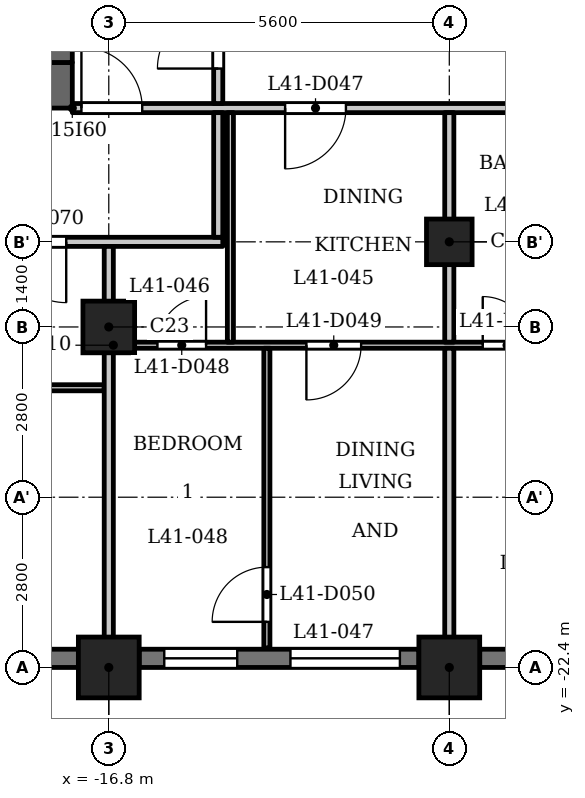
"""IFC4 building model, lengths in metres.
Left out: names, types, materials, properties, quantities, classifications, styles, units other than length and angle.
Written with IfcOpenShell. Run it as: python <this file> out.ifc"""

import sys

from ifc_helpers import new_model, si_unit, direction, frame, frame_2d, origin, origin_2d, place, context, subcontext, project, spatial, rectangle, extrude, element, fill, save


model = new_model("IFC4")
c1 = context("Model", 3, precision=1e-05, world=origin(), true_north=direction((0.0, 1.0)))
c2 = subcontext(c1, "Body", "Model", "MODEL_VIEW")
j1 = project(units=[si_unit("LENGTHUNIT", "METRE"), si_unit("PLANEANGLEUNIT", "RADIAN")], contexts=[c1])
p1 = place(None, origin())
s1 = spatial("IfcSite", under=j1, at=p1, CompositionType="ELEMENT")
p2 = place(p1, origin())
s2 = spatial("IfcBuilding", under=s1, at=p2, CompositionType="ELEMENT")
p3 = place(p2, frame((0.0, 0.0, 160.6)))
s3 = spatial("IfcBuildingStorey", under=s2, at=p3, CompositionType="ELEMENT", Elevation=160.6)
for number, where, z_axis, x_axis in (
    (1, (-16.8, -22.4, 0.0), (0.0, 0.0, 1.0), (1.0, 0.0, 0.0)),
    (2, (-11.2, -22.4, 0.0), (0.0, 0.0, 1.0), (1.0, 0.0, 0.0)),
):
    element("IfcColumn", number, at=place(p3, frame(where, z_axis=z_axis, x_axis=x_axis)), inside=s3, PredefinedType="COLUMN", context=c2, shape_type="SweptSolid", body=[
        extrude(rectangle(XDim=1.0, YDim=1.0, at=origin_2d()), origin(), (0.0, 0.0, 1.0), 3.5),
    ])
p4 = place(p3, frame((-16.8, -16.8, 0.0), z_axis=(0.0, 0.0, 1.0), x_axis=(1.0, 0.0, 0.0)))
e3 = element("IfcColumn", 3, at=p4, inside=s3, PredefinedType="COLUMN", context=c2, shape_type="SweptSolid", body=[
    extrude(rectangle(XDim=0.85, YDim=0.85, at=origin_2d()), origin(), (0.0, 0.0, 1.0), 3.5),
])
p5 = place(p3, frame((-11.2, -15.4, 0.0), z_axis=(0.0, 0.0, 1.0), x_axis=(1.0, 0.0, 0.0)))
e4 = element("IfcColumn", 4, at=p5, inside=s3, PredefinedType="COLUMN", context=c2, shape_type="SweptSolid", body=[
    extrude(rectangle(XDim=0.75, YDim=0.75, at=origin_2d()), origin(), (0.0, 0.0, 1.0), 3.5),
])
p6 = place(p3, frame((-20.0, -22.25, 0.0), z_axis=(0.0, 0.0, 1.0), x_axis=(1.0, 0.0, 0.0)))
e5 = element("IfcWall", 5, at=p6, inside=s3, PredefinedType="SOLIDWALL", context=c2, shape_type="SweptSolid", body=[
    extrude(rectangle(XDim=2.7, YDim=0.3, at=frame_2d((1.35, 0.0))), origin(), (0.0, 0.0, 1.0), 2.45),
])
p7 = place(p6, frame((0.75, 0.0, 0.6)))
e6 = element("IfcOpeningElement", 6, at=p7, cuts=e5, PredefinedType="OPENING", context=c2, shape_type="SweptSolid", body=[
    extrude(rectangle(XDim=1.2, YDim=1.55, at=frame_2d((0.6, 0.775))), frame((0.0, 0.16, 0.0), z_axis=(0.0, -1.0, 0.0), x_axis=(1.0, 0.0, 0.0)), (0.0, 0.0, 1.0), 0.32),
])
p8 = place(p3, frame((-16.3, -22.25, 0.0), z_axis=(0.0, 0.0, 1.0), x_axis=(1.0, 0.0, 0.0)))
e7 = element("IfcWall", 7, at=p8, inside=s3, PredefinedType="SOLIDWALL", context=c2, shape_type="SweptSolid", body=[
    extrude(rectangle(XDim=4.6, YDim=0.3, at=frame_2d((2.3, 0.0))), origin(), (0.0, 0.0, 1.0), 2.45),
])
p9 = place(p8, frame((0.413, 0.0, 0.6)))
e8 = element("IfcOpeningElement", 8, at=p9, cuts=e7, PredefinedType="OPENING", context=c2, shape_type="SweptSolid", body=[
    extrude(rectangle(XDim=1.2, YDim=1.55, at=frame_2d((0.6, 0.775))), frame((0.0, 0.16, 0.0), z_axis=(0.0, -1.0, 0.0), x_axis=(1.0, 0.0, 0.0)), (0.0, 0.0, 1.0), 0.32),
])
p10 = place(p8, frame((2.488, 0.0, 0.9)))
e9 = element("IfcOpeningElement", 9, at=p10, cuts=e7, PredefinedType="OPENING", context=c2, shape_type="SweptSolid", body=[
    extrude(rectangle(XDim=1.8, YDim=1.25, at=frame_2d((0.9, 0.625))), frame((0.0, 0.16, 0.0), z_axis=(0.0, -1.0, 0.0), x_axis=(1.0, 0.0, 0.0)), (0.0, 0.0, 1.0), 0.32),
])
p11 = place(p3, frame((-10.7, -22.25, 0.0), z_axis=(0.0, 0.0, 1.0), x_axis=(1.0, 0.0, 0.0)))
e10 = element("IfcWall", 10, at=p11, inside=s3, PredefinedType="SOLIDWALL", context=c2, shape_type="SweptSolid", body=[
    extrude(rectangle(XDim=4.6, YDim=0.3, at=frame_2d((2.3, 0.0))), origin(), (0.0, 0.0, 1.0), 2.45),
])
p12 = place(p11, frame((0.5, 0.0, 1.2)))
e11 = element("IfcOpeningElement", 11, at=p12, cuts=e10, PredefinedType="OPENING", context=c2, shape_type="SweptSolid", body=[
    extrude(rectangle(XDim=3.6, YDim=0.95, at=frame_2d((1.8, 0.475))), frame((0.0, 0.16, 0.0), z_axis=(0.0, -1.0, 0.0), x_axis=(1.0, 0.0, 0.0)), (0.0, 0.0, 1.0), 0.32),
])
p13 = place(p3, frame((-17.4, -12.825, 0.0), z_axis=(0.0, 0.0, 1.0), x_axis=(-1.0, 0.0, 0.0)))
e12 = element("IfcWall", 12, at=p13, inside=s3, PredefinedType="SHEAR", context=c2, shape_type="SweptSolid", body=[
    extrude(rectangle(XDim=10.4, YDim=0.75, at=frame_2d((5.2, 0.0))), origin(), (0.0, 0.0, 1.0), 3.2),
])
p14 = place(p3, frame((-17.6, -12.45, 0.0), z_axis=(0.0, 0.0, 1.0), x_axis=(0.0, 1.0, 0.0)))
e13 = element("IfcWall", 13, at=p14, inside=s3, PredefinedType="SHEAR", context=c2, shape_type="SweptSolid", body=[
    extrude(rectangle(XDim=24.9, YDim=0.4, at=frame_2d((12.45, 0.0))), origin(), (0.0, 0.0, 1.0), 3.2),
])
p15 = place(p14, frame((8.65, 0.0, 0.0)))
e14 = element("IfcOpeningElement", 14, at=p15, cuts=e13, PredefinedType="OPENING", context=c2, shape_type="SweptSolid", body=[
    extrude(rectangle(XDim=0.9, YDim=2.1, at=frame_2d((0.45, 1.05))), frame((0.0, 0.21, 0.0), z_axis=(0.0, -1.0, 0.0), x_axis=(1.0, 0.0, 0.0)), (0.0, 0.0, 1.0), 0.42),
])
p16 = place(p14, frame((15.6, 0.0, 0.0)))
e15 = element("IfcOpeningElement", 15, at=p16, cuts=e13, PredefinedType="OPENING", context=c2, shape_type="SweptSolid", body=[
    extrude(rectangle(XDim=1.1, YDim=2.1, at=frame_2d((0.55, 1.05))), frame((0.0, 0.21, 0.0), z_axis=(0.0, -1.0, 0.0), x_axis=(1.0, 0.0, 0.0)), (0.0, 0.0, 1.0), 0.42),
])
p17 = place(p14, frame((18.0, 0.0, 0.0)))
e16 = element("IfcOpeningElement", 16, at=p17, cuts=e13, PredefinedType="OPENING", context=c2, shape_type="SweptSolid", body=[
    extrude(rectangle(XDim=1.1, YDim=2.1, at=frame_2d((0.55, 1.05))), frame((0.0, 0.21, 0.0), z_axis=(0.0, -1.0, 0.0), x_axis=(1.0, 0.0, 0.0)), (0.0, 0.0, 1.0), 0.42),
])
p18 = place(p14, frame((23.025, 0.0, 0.0)))
e17 = element("IfcOpeningElement", 17, at=p18, cuts=e13, PredefinedType="OPENING", context=c2, shape_type="SweptSolid", body=[
    extrude(rectangle(XDim=1.1, YDim=2.1, at=frame_2d((0.55, 1.05))), frame((0.0, 0.21, 0.0), z_axis=(0.0, -1.0, 0.0), x_axis=(1.0, 0.0, 0.0)), (0.0, 0.0, 1.0), 0.42),
])
p19 = place(p14, frame((0.775, 0.0, 0.0)))
e18 = element("IfcOpeningElement", 18, at=p19, cuts=e13, PredefinedType="OPENING", context=c2, shape_type="SweptSolid", body=[
    extrude(rectangle(XDim=1.1, YDim=2.1, at=frame_2d((0.55, 1.05))), frame((0.0, 0.21, 0.0), z_axis=(0.0, -1.0, 0.0), x_axis=(1.0, 0.0, 0.0)), (0.0, 0.0, 1.0), 0.42),
])
p20 = place(p14, frame((12.925, 0.0, 0.0)))
e19 = element("IfcOpeningElement", 19, at=p20, cuts=e13, PredefinedType="OPENING", context=c2, shape_type="SweptSolid", body=[
    extrude(rectangle(XDim=1.8, YDim=2.1, at=frame_2d((0.9, 1.05))), frame((0.0, 0.21, 0.0), z_axis=(0.0, -1.0, 0.0), x_axis=(1.0, 0.0, 0.0)), (0.0, 0.0, 1.0), 0.42),
])
p21 = place(p3, frame((-26.394, -17.8, 0.0), z_axis=(0.0, 0.0, 1.0), x_axis=(1.0, 0.0, 0.0)))
e20 = element("IfcWall", 20, at=p21, inside=s3, PredefinedType="PARTITIONING", context=c2, shape_type="SweptSolid", body=[
    extrude(rectangle(XDim=9.519, YDim=0.1, at=frame_2d((4.76, 0.0))), origin(), (0.0, 0.0, 1.0), 3.2),
])
p22 = place(p21, frame((2.544, 0.0, 0.0)))
e21 = element("IfcOpeningElement", 21, at=p22, cuts=e20, PredefinedType="OPENING", context=c2, shape_type="SweptSolid", body=[
    extrude(rectangle(XDim=0.8, YDim=2.1, at=frame_2d((0.4, 1.05))), frame((0.0, 0.06, 0.0), z_axis=(0.0, -1.0, 0.0), x_axis=(1.0, 0.0, 0.0)), (0.0, 0.0, 1.0), 0.12),
])
p23 = place(p21, frame((6.894, 0.0, 0.0)))
e22 = element("IfcOpeningElement", 22, at=p23, cuts=e20, PredefinedType="OPENING", context=c2, shape_type="SweptSolid", body=[
    extrude(rectangle(XDim=0.9, YDim=2.1, at=frame_2d((0.45, 1.05))), frame((0.0, 0.06, 0.0), z_axis=(0.0, -1.0, 0.0), x_axis=(1.0, 0.0, 0.0)), (0.0, 0.0, 1.0), 0.12),
])
p24 = place(p3, frame((-16.725, -17.1, 0.0), z_axis=(0.0, 0.0, 1.0), x_axis=(1.0, 0.0, 0.0)))
e23 = element("IfcWall", 23, at=p24, inside=s3, PredefinedType="PARTITIONING", context=c2, shape_type="SweptSolid", body=[
    extrude(rectangle(XDim=33.45, YDim=0.1, at=frame_2d((16.725, 0.0))), origin(), (0.0, 0.0, 1.0), 3.2),
])
p25 = place(p24, frame((0.725, 0.0, 0.0)))
e24 = element("IfcOpeningElement", 24, at=p25, cuts=e23, PredefinedType="OPENING", context=c2, shape_type="SweptSolid", body=[
    extrude(rectangle(XDim=0.8, YDim=2.1, at=frame_2d((0.4, 1.05))), frame((0.0, 0.06, 0.0), z_axis=(0.0, -1.0, 0.0), x_axis=(1.0, 0.0, 0.0)), (0.0, 0.0, 1.0), 0.12),
])
p26 = place(p24, frame((3.175, 0.0, 0.0)))
e25 = element("IfcOpeningElement", 25, at=p26, cuts=e23, PredefinedType="OPENING", context=c2, shape_type="SweptSolid", body=[
    extrude(rectangle(XDim=0.9, YDim=2.1, at=frame_2d((0.45, 1.05))), frame((0.0, 0.06, 0.0), z_axis=(0.0, -1.0, 0.0), x_axis=(1.0, 0.0, 0.0)), (0.0, 0.0, 1.0), 0.12),
])
p27 = place(p24, frame((6.075, 0.0, 0.0)))
e26 = element("IfcOpeningElement", 26, at=p27, cuts=e23, PredefinedType="OPENING", context=c2, shape_type="SweptSolid", body=[
    extrude(rectangle(XDim=0.8, YDim=2.1, at=frame_2d((0.4, 1.05))), frame((0.0, 0.06, 0.0), z_axis=(0.0, -1.0, 0.0), x_axis=(1.0, 0.0, 0.0)), (0.0, 0.0, 1.0), 0.12),
])
p28 = place(p24, frame((9.425, 0.0, 0.0)))
e27 = element("IfcOpeningElement", 27, at=p28, cuts=e23, PredefinedType="OPENING", context=c2, shape_type="SweptSolid", body=[
    extrude(rectangle(XDim=0.9, YDim=2.1, at=frame_2d((0.45, 1.05))), frame((0.0, 0.06, 0.0), z_axis=(0.0, -1.0, 0.0), x_axis=(1.0, 0.0, 0.0)), (0.0, 0.0, 1.0), 0.12),
])
p29 = place(p24, frame((12.675, 0.0, 0.0)))
e28 = element("IfcOpeningElement", 28, at=p29, cuts=e23, PredefinedType="OPENING", context=c2, shape_type="SweptSolid", body=[
    extrude(rectangle(XDim=0.8, YDim=2.1, at=frame_2d((0.4, 1.05))), frame((0.0, 0.06, 0.0), z_axis=(0.0, -1.0, 0.0), x_axis=(1.0, 0.0, 0.0)), (0.0, 0.0, 1.0), 0.12),
])
p30 = place(p24, frame((15.275, 0.0, 0.0)))
e29 = element("IfcOpeningElement", 29, at=p30, cuts=e23, PredefinedType="OPENING", context=c2, shape_type="SweptSolid", body=[
    extrude(rectangle(XDim=0.9, YDim=2.1, at=frame_2d((0.45, 1.05))), frame((0.0, 0.06, 0.0), z_axis=(0.0, -1.0, 0.0), x_axis=(1.0, 0.0, 0.0)), (0.0, 0.0, 1.0), 0.12),
])
p31 = place(p24, frame((20.625, 0.0, 0.0)))
e30 = element("IfcOpeningElement", 30, at=p31, cuts=e23, PredefinedType="OPENING", context=c2, shape_type="SweptSolid", body=[
    extrude(rectangle(XDim=0.8, YDim=2.1, at=frame_2d((0.4, 1.05))), frame((0.0, 0.06, 0.0), z_axis=(0.0, -1.0, 0.0), x_axis=(1.0, 0.0, 0.0)), (0.0, 0.0, 1.0), 0.12),
])
p32 = place(p24, frame((17.375, 0.0, 0.0)))
e31 = element("IfcOpeningElement", 31, at=p32, cuts=e23, PredefinedType="OPENING", context=c2, shape_type="SweptSolid", body=[
    extrude(rectangle(XDim=0.9, YDim=2.1, at=frame_2d((0.45, 1.05))), frame((0.0, 0.06, 0.0), z_axis=(0.0, -1.0, 0.0), x_axis=(1.0, 0.0, 0.0)), (0.0, 0.0, 1.0), 0.12),
])
p33 = place(p24, frame((31.075, 0.0, 0.0)))
e32 = element("IfcOpeningElement", 32, at=p33, cuts=e23, PredefinedType="OPENING", context=c2, shape_type="SweptSolid", body=[
    extrude(rectangle(XDim=0.8, YDim=2.1, at=frame_2d((0.4, 1.05))), frame((0.0, 0.06, 0.0), z_axis=(0.0, -1.0, 0.0), x_axis=(1.0, 0.0, 0.0)), (0.0, 0.0, 1.0), 0.12),
])
p34 = place(p24, frame((29.325, 0.0, 0.0)))
e33 = element("IfcOpeningElement", 33, at=p34, cuts=e23, PredefinedType="OPENING", context=c2, shape_type="SweptSolid", body=[
    extrude(rectangle(XDim=0.9, YDim=2.1, at=frame_2d((0.45, 1.05))), frame((0.0, 0.06, 0.0), z_axis=(0.0, -1.0, 0.0), x_axis=(1.0, 0.0, 0.0)), (0.0, 0.0, 1.0), 0.12),
])
p35 = place(p24, frame((23.725, 0.0, 0.0)))
e34 = element("IfcOpeningElement", 34, at=p35, cuts=e23, PredefinedType="OPENING", context=c2, shape_type="SweptSolid", body=[
    extrude(rectangle(XDim=0.9, YDim=2.1, at=frame_2d((0.45, 1.05))), frame((0.0, 0.06, 0.0), z_axis=(0.0, -1.0, 0.0), x_axis=(1.0, 0.0, 0.0)), (0.0, 0.0, 1.0), 0.12),
])
p36 = place(p24, frame((25.775, 0.0, 0.0)))
e35 = element("IfcOpeningElement", 35, at=p36, cuts=e23, PredefinedType="OPENING", context=c2, shape_type="SweptSolid", body=[
    extrude(rectangle(XDim=0.9, YDim=2.1, at=frame_2d((0.45, 1.05))), frame((0.0, 0.06, 0.0), z_axis=(0.0, -1.0, 0.0), x_axis=(1.0, 0.0, 0.0)), (0.0, 0.0, 1.0), 0.12),
])
p37 = place(p3, frame((-27.484, -15.4, 0.0), z_axis=(0.0, 0.0, 1.0), x_axis=(1.0, 0.0, 0.0)))
e36 = element("IfcWall", 36, at=p37, inside=s3, PredefinedType="PARTITIONING", context=c2, shape_type="SweptSolid", body=[
    extrude(rectangle(XDim=12.559, YDim=0.15, at=frame_2d((6.279, 0.0))), origin(), (0.0, 0.0, 1.0), 3.2),
])
p38 = place(p37, frame((8.984, 0.0, 0.0)))
e37 = element("IfcOpeningElement", 37, at=p38, cuts=e36, PredefinedType="OPENING", context=c2, shape_type="SweptSolid", body=[
    extrude(rectangle(XDim=1.0, YDim=2.1, at=frame_2d((0.5, 1.05))), frame((0.0, 0.085, 0.0), z_axis=(0.0, -1.0, 0.0), x_axis=(1.0, 0.0, 0.0)), (0.0, 0.0, 1.0), 0.17),
])
p39 = place(p3, frame((-17.4, -13.2, 0.0), z_axis=(0.0, 0.0, 1.0), x_axis=(1.0, 0.0, 0.0)))
e38 = element("IfcWall", 38, at=p39, inside=s3, PredefinedType="PARTITIONING", context=c2, shape_type="SweptSolid", body=[
    extrude(rectangle(XDim=34.8, YDim=0.15, at=frame_2d((17.4, 0.0))), origin(), (0.0, 0.0, 1.0), 3.2),
])
p40 = place(p39, frame((0.15, 0.0, 0.0)))
e39 = element("IfcOpeningElement", 39, at=p40, cuts=e38, PredefinedType="OPENING", context=c2, shape_type="SweptSolid", body=[
    extrude(rectangle(XDim=1.0, YDim=2.1, at=frame_2d((0.5, 1.05))), frame((0.0, 0.085, 0.0), z_axis=(0.0, -1.0, 0.0), x_axis=(1.0, 0.0, 0.0)), (0.0, 0.0, 1.0), 0.17),
])
p41 = place(p39, frame((33.55, 0.0, 0.0)))
e40 = element("IfcOpeningElement", 40, at=p41, cuts=e38, PredefinedType="OPENING", context=c2, shape_type="SweptSolid", body=[
    extrude(rectangle(XDim=1.0, YDim=2.1, at=frame_2d((0.5, 1.05))), frame((0.0, 0.085, 0.0), z_axis=(0.0, -1.0, 0.0), x_axis=(1.0, 0.0, 0.0)), (0.0, 0.0, 1.0), 0.17),
])
p42 = place(p39, frame((3.5, 0.0, 0.0)))
e41 = element("IfcOpeningElement", 41, at=p42, cuts=e38, PredefinedType="OPENING", context=c2, shape_type="SweptSolid", body=[
    extrude(rectangle(XDim=1.0, YDim=2.1, at=frame_2d((0.5, 1.05))), frame((0.0, 0.085, 0.0), z_axis=(0.0, -1.0, 0.0), x_axis=(1.0, 0.0, 0.0)), (0.0, 0.0, 1.0), 0.17),
])
p43 = place(p39, frame((10.1, 0.0, 0.0)))
e42 = element("IfcOpeningElement", 42, at=p43, cuts=e38, PredefinedType="OPENING", context=c2, shape_type="SweptSolid", body=[
    extrude(rectangle(XDim=1.0, YDim=2.1, at=frame_2d((0.5, 1.05))), frame((0.0, 0.085, 0.0), z_axis=(0.0, -1.0, 0.0), x_axis=(1.0, 0.0, 0.0)), (0.0, 0.0, 1.0), 0.17),
])
p44 = place(p39, frame((15.7, 0.0, 0.0)))
e43 = element("IfcOpeningElement", 43, at=p44, cuts=e38, PredefinedType="OPENING", context=c2, shape_type="SweptSolid", body=[
    extrude(rectangle(XDim=1.0, YDim=2.1, at=frame_2d((0.5, 1.05))), frame((0.0, 0.085, 0.0), z_axis=(0.0, -1.0, 0.0), x_axis=(1.0, 0.0, 0.0)), (0.0, 0.0, 1.0), 0.17),
])
p45 = place(p39, frame((18.05, 0.0, 0.0)))
e44 = element("IfcOpeningElement", 44, at=p45, cuts=e38, PredefinedType="OPENING", context=c2, shape_type="SweptSolid", body=[
    extrude(rectangle(XDim=1.0, YDim=2.1, at=frame_2d((0.5, 1.05))), frame((0.0, 0.085, 0.0), z_axis=(0.0, -1.0, 0.0), x_axis=(1.0, 0.0, 0.0)), (0.0, 0.0, 1.0), 0.17),
])
p46 = place(p39, frame((26.9, 0.0, 0.0)))
e45 = element("IfcOpeningElement", 45, at=p46, cuts=e38, PredefinedType="OPENING", context=c2, shape_type="SweptSolid", body=[
    extrude(rectangle(XDim=1.0, YDim=2.1, at=frame_2d((0.5, 1.05))), frame((0.0, 0.085, 0.0), z_axis=(0.0, -1.0, 0.0), x_axis=(1.0, 0.0, 0.0)), (0.0, 0.0, 1.0), 0.17),
])
p47 = place(p3, frame((-16.8, -22.88, 0.0), z_axis=(0.0, 0.0, 1.0), x_axis=(0.0, 1.0, 0.0)))
e46 = element("IfcWall", 46, at=p47, inside=s3, PredefinedType="PARTITIONING", context=c2, shape_type="SweptSolid", body=[
    extrude(rectangle(XDim=7.405, YDim=0.15, at=frame_2d((3.702, 0.0))), origin(), (0.0, 0.0, 1.0), 3.2),
])
p48 = place(p3, frame((-15.0, -15.325, 0.0), z_axis=(0.0, 0.0, 1.0), x_axis=(0.0, 1.0, 0.0)))
e47 = element("IfcWall", 47, at=p48, inside=s3, PredefinedType="PARTITIONING", context=c2, shape_type="SweptSolid", body=[
    extrude(rectangle(XDim=2.05, YDim=0.15, at=frame_2d((1.025, 0.0))), origin(), (0.0, 0.0, 1.0), 3.2),
])
p49 = place(p3, frame((-15.0, -13.125, 0.0), z_axis=(0.0, 0.0, 1.0), x_axis=(0.0, 1.0, 0.0)))
e48 = element("IfcWall", 48, at=p49, inside=s3, PredefinedType="PARTITIONING", context=c2, shape_type="SweptSolid", body=[
    extrude(rectangle(XDim=6.356, YDim=0.15, at=frame_2d((3.178, 0.0))), origin(), (0.0, 0.0, 1.0), 3.2),
])
p50 = place(p49, frame((0.575, 0.0, 0.0)))
e49 = element("IfcOpeningElement", 49, at=p50, cuts=e48, PredefinedType="OPENING", context=c2, shape_type="SweptSolid", body=[
    extrude(rectangle(XDim=1.0, YDim=2.1, at=frame_2d((0.5, 1.05))), frame((0.0, 0.085, 0.0), z_axis=(0.0, -1.0, 0.0), x_axis=(1.0, 0.0, 0.0)), (0.0, 0.0, 1.0), 0.17),
])
p51 = place(p3, frame((-14.8, -17.05, 0.0), z_axis=(0.0, 0.0, 1.0), x_axis=(0.0, 1.0, 0.0)))
e50 = element("IfcWall", 50, at=p51, inside=s3, PredefinedType="PARTITIONING", context=c2, shape_type="SweptSolid", body=[
    extrude(rectangle(XDim=3.775, YDim=0.1, at=frame_2d((1.888, 0.0))), origin(), (0.0, 0.0, 1.0), 3.2),
])
p52 = place(p3, frame((-14.2, -22.08, 0.0), z_axis=(0.0, 0.0, 1.0), x_axis=(0.0, 1.0, 0.0)))
e51 = element("IfcWall", 51, at=p52, inside=s3, PredefinedType="PARTITIONING", context=c2, shape_type="SweptSolid", body=[
    extrude(rectangle(XDim=4.93, YDim=0.1, at=frame_2d((2.465, 0.0))), origin(), (0.0, 0.0, 1.0), 3.2),
])
p53 = place(p52, frame((0.43, 0.0, 0.0)))
e52 = element("IfcOpeningElement", 52, at=p53, cuts=e51, PredefinedType="OPENING", context=c2, shape_type="SweptSolid", body=[
    extrude(rectangle(XDim=0.9, YDim=2.1, at=frame_2d((0.45, 1.05))), frame((0.0, 0.06, 0.0), z_axis=(0.0, -1.0, 0.0), x_axis=(1.0, 0.0, 0.0)), (0.0, 0.0, 1.0), 0.12),
])
p54 = place(p3, frame((-11.2, -22.88, 0.0), z_axis=(0.0, 0.0, 1.0), x_axis=(0.0, 1.0, 0.0)))
e53 = element("IfcWall", 53, at=p54, inside=s3, PredefinedType="PARTITIONING", context=c2, shape_type="SweptSolid", body=[
    extrude(rectangle(XDim=5.73, YDim=0.15, at=frame_2d((2.865, 0.0))), origin(), (0.0, 0.0, 1.0), 3.2),
])
p55 = place(p3, frame((-11.2, -17.05, 0.0), z_axis=(0.0, 0.0, 1.0), x_axis=(0.0, 1.0, 0.0)))
e54 = element("IfcWall", 54, at=p55, inside=s3, PredefinedType="PARTITIONING", context=c2, shape_type="SweptSolid", body=[
    extrude(rectangle(XDim=3.775, YDim=0.15, at=frame_2d((1.888, 0.0))), origin(), (0.0, 0.0, 1.0), 3.2),
])
p56 = place(p50, origin())
e55 = element("IfcDoor", 55, at=p56, inside=s3, OperationType="SINGLE_SWING_RIGHT", PredefinedType="DOOR", context=c2, shape_type="SweptSolid", body=[
    extrude(rectangle(XDim=1.0, YDim=2.1, at=frame_2d((0.5, 1.05))), frame((0.0, 0.025, 0.0), z_axis=(0.0, -1.0, 0.0), x_axis=(1.0, 0.0, 0.0)), (0.0, 0.0, 1.0), 0.05),
])
fill(e49, e55)
p57 = place(p40, origin())
e56 = element("IfcDoor", 56, at=p57, inside=s3, OperationType="SINGLE_SWING_RIGHT", PredefinedType="DOOR", context=c2, shape_type="SweptSolid", body=[
    extrude(rectangle(XDim=1.0, YDim=2.1, at=frame_2d((0.5, 1.05))), frame((0.0, 0.025, 0.0), z_axis=(0.0, -1.0, 0.0), x_axis=(1.0, 0.0, 0.0)), (0.0, 0.0, 1.0), 0.05),
])
fill(e39, e56)
p58 = place(p42, origin())
e57 = element("IfcDoor", 57, at=p58, inside=s3, OperationType="SINGLE_SWING_LEFT", PredefinedType="DOOR", context=c2, shape_type="SweptSolid", body=[
    extrude(rectangle(XDim=1.0, YDim=2.1, at=frame_2d((0.5, 1.05))), frame((0.0, 0.025, 0.0), z_axis=(0.0, -1.0, 0.0), x_axis=(1.0, 0.0, 0.0)), (0.0, 0.0, 1.0), 0.05),
])
fill(e41, e57)
p59 = place(p25, origin())
e58 = element("IfcDoor", 58, at=p59, inside=s3, OperationType="SINGLE_SWING_LEFT", PredefinedType="DOOR", context=c2, shape_type="SweptSolid", body=[
    extrude(rectangle(XDim=0.8, YDim=2.1, at=frame_2d((0.4, 1.05))), frame((0.0, 0.025, 0.0), z_axis=(0.0, -1.0, 0.0), x_axis=(1.0, 0.0, 0.0)), (0.0, 0.0, 1.0), 0.05),
])
fill(e24, e58)
p60 = place(p26, origin())
e59 = element("IfcDoor", 59, at=p60, inside=s3, OperationType="SINGLE_SWING_LEFT", PredefinedType="DOOR", context=c2, shape_type="SweptSolid", body=[
    extrude(rectangle(XDim=0.9, YDim=2.1, at=frame_2d((0.45, 1.05))), frame((0.0, 0.025, 0.0), z_axis=(0.0, -1.0, 0.0), x_axis=(1.0, 0.0, 0.0)), (0.0, 0.0, 1.0), 0.05),
])
fill(e25, e59)
p61 = place(p53, origin())
e60 = element("IfcDoor", 60, at=p61, inside=s3, OperationType="SINGLE_SWING_RIGHT", PredefinedType="DOOR", context=c2, shape_type="SweptSolid", body=[
    extrude(rectangle(XDim=0.9, YDim=2.1, at=frame_2d((0.45, 1.05))), frame((0.0, 0.025, 0.0), z_axis=(0.0, -1.0, 0.0), x_axis=(1.0, 0.0, 0.0)), (0.0, 0.0, 1.0), 0.05),
])
fill(e52, e60)
p62 = place(p27, origin())
e61 = element("IfcDoor", 61, at=p62, inside=s3, OperationType="SINGLE_SWING_RIGHT", PredefinedType="DOOR", context=c2, shape_type="SweptSolid", body=[
    extrude(rectangle(XDim=0.8, YDim=2.1, at=frame_2d((0.4, 1.05))), frame((0.0, 0.025, 0.0), z_axis=(0.0, -1.0, 0.0), x_axis=(1.0, 0.0, 0.0)), (0.0, 0.0, 1.0), 0.05),
])
fill(e26, e61)
p63 = place(p38, origin())
e62 = element("IfcDoor", 62, at=p63, inside=s3, OperationType="SINGLE_SWING_RIGHT", PredefinedType="DOOR", context=c2, shape_type="SweptSolid", body=[
    extrude(rectangle(XDim=1.0, YDim=2.1, at=frame_2d((0.5, 1.05))), frame((0.0, 0.025, 0.0), z_axis=(0.0, -1.0, 0.0), x_axis=(1.0, 0.0, 0.0)), (0.0, 0.0, 1.0), 0.05),
])
fill(e37, e62)
p64 = place(p9, origin())
e63 = element("IfcWindow", 63, at=p64, inside=s3, PartitioningType="SINGLE_PANEL", PredefinedType="WINDOW", context=c2, shape_type="SweptSolid", body=[
    extrude(rectangle(XDim=1.2, YDim=1.55, at=frame_2d((0.6, 0.775))), frame((0.0, 0.03, 0.0), z_axis=(0.0, -1.0, 0.0), x_axis=(1.0, 0.0, 0.0)), (0.0, 0.0, 1.0), 0.06),
])
fill(e8, e63)
p65 = place(p10, origin())
e64 = element("IfcWindow", 64, at=p65, inside=s3, PartitioningType="SINGLE_PANEL", PredefinedType="WINDOW", context=c2, shape_type="SweptSolid", body=[
    extrude(rectangle(XDim=1.8, YDim=1.25, at=frame_2d((0.9, 0.625))), frame((0.0, 0.03, 0.0), z_axis=(0.0, -1.0, 0.0), x_axis=(1.0, 0.0, 0.0)), (0.0, 0.0, 1.0), 0.06),
])
fill(e9, e64)
save(model, sys.argv[1])
